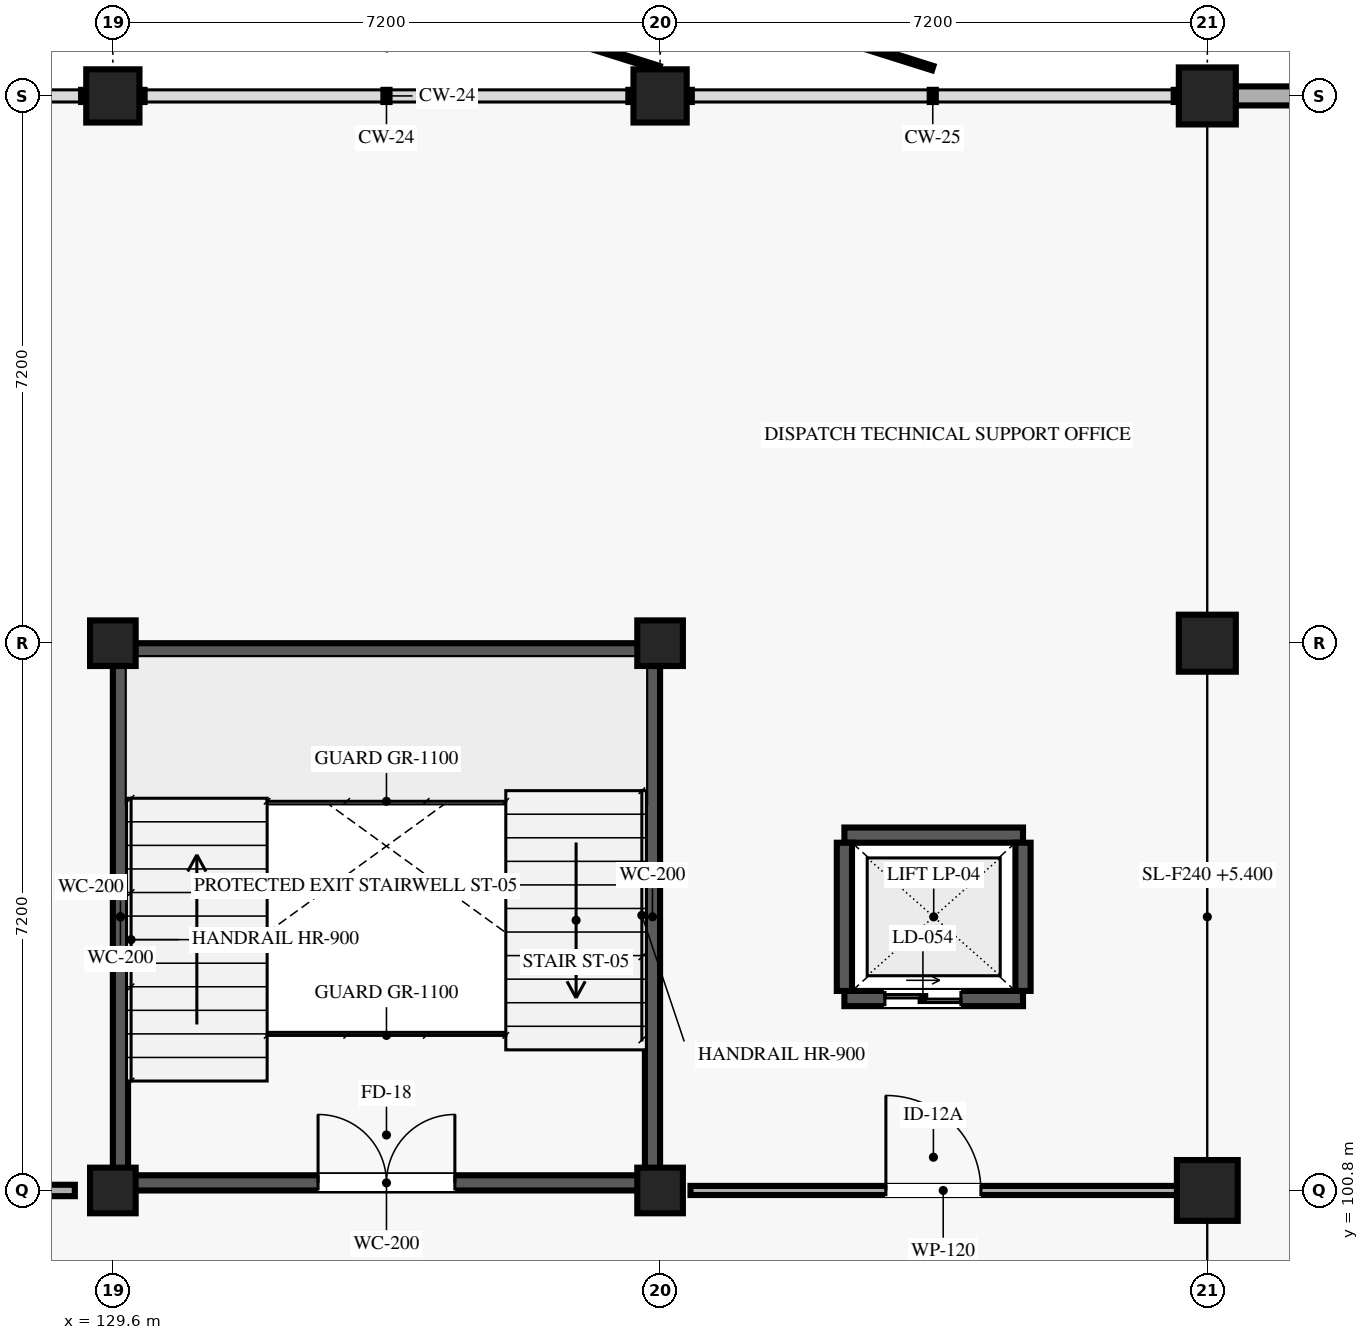
"""IFC4 building model, lengths in metres.
Left out: names, types, materials, properties, quantities, classifications, styles, units other than length and angle.
Written with IfcOpenShell. Run it as: python <this file> out.ifc"""

import sys

from ifc_helpers import new_model, si_unit, direction, frame, frame_2d, origin, origin_2d, place, context, subcontext, project, spatial, rectangle, extrude, element, fill, save


model = new_model("IFC4")
c1 = context("Model", 3, precision=1e-05, world=origin(), true_north=direction((0.0, 1.0)))
c2 = subcontext(c1, "Body", "Model", "MODEL_VIEW")
j1 = project(units=[si_unit("LENGTHUNIT", "METRE"), si_unit("PLANEANGLEUNIT", "RADIAN")], contexts=[c1])
p1 = place(None, origin())
s1 = spatial("IfcSite", under=j1, at=p1, CompositionType="ELEMENT")
p2 = place(p1, origin())
s2 = spatial("IfcBuilding", under=s1, at=p2, CompositionType="ELEMENT")
p3 = place(p2, frame((0.0, 0.0, 5.4)))
s3 = spatial("IfcBuildingStorey", under=s2, at=p3, CompositionType="ELEMENT", Elevation=5.4)
for number, where, z_axis, x_axis in (
    (1, (129.6, 100.8, 0.0), (0.0, 0.0, 1.0), (1.0, 0.0, 0.0)),
    (2, (129.6, 108.0, 0.0), (0.0, 0.0, 1.0), (1.0, 0.0, 0.0)),
):
    element("IfcColumn", number, at=place(p3, frame(where, z_axis=z_axis, x_axis=x_axis)), inside=s3, PredefinedType="COLUMN", context=c2, shape_type="SweptSolid", body=[
        extrude(rectangle(XDim=0.6, YDim=0.6, at=origin_2d()), origin(), (0.0, 0.0, 1.0), 4.05),
    ])
p4 = place(p3, frame((129.6, 115.2, 0.0), z_axis=(0.0, 0.0, 1.0), x_axis=(1.0, 0.0, 0.0)))
e3 = element("IfcColumn", 3, at=p4, inside=s3, PredefinedType="COLUMN", context=c2, shape_type="SweptSolid", body=[
    extrude(rectangle(XDim=0.7, YDim=0.7, at=origin_2d()), origin(), (0.0, 0.0, 1.0), 4.05),
])
for number, where, z_axis, x_axis in (
    (4, (136.8, 100.8, 0.0), (0.0, 0.0, 1.0), (1.0, 0.0, 0.0)),
    (5, (136.8, 108.0, 0.0), (0.0, 0.0, 1.0), (1.0, 0.0, 0.0)),
):
    element("IfcColumn", number, at=place(p3, frame(where, z_axis=z_axis, x_axis=x_axis)), inside=s3, PredefinedType="COLUMN", context=c2, shape_type="SweptSolid", body=[
        extrude(rectangle(XDim=0.6, YDim=0.6, at=origin_2d()), origin(), (0.0, 0.0, 1.0), 4.05),
    ])
p5 = place(p3, frame((136.8, 115.2, 0.0), z_axis=(0.0, 0.0, 1.0), x_axis=(1.0, 0.0, 0.0)))
e6 = element("IfcColumn", 6, at=p5, inside=s3, PredefinedType="COLUMN", context=c2, shape_type="SweptSolid", body=[
    extrude(rectangle(XDim=0.7, YDim=0.7, at=origin_2d()), origin(), (0.0, 0.0, 1.0), 4.05),
])
p6 = place(p3, frame((144.0, 100.8, 0.0), z_axis=(0.0, 0.0, 1.0), x_axis=(1.0, 0.0, 0.0)))
e7 = element("IfcColumn", 7, at=p6, inside=s3, PredefinedType="COLUMN", context=c2, shape_type="SweptSolid", body=[
    extrude(rectangle(XDim=0.8, YDim=0.8, at=origin_2d()), origin(), (0.0, 0.0, 1.0), 4.05),
])
for number, where, z_axis, x_axis in (
    (8, (144.0, 108.0, 0.0), (0.0, 0.0, 1.0), (1.0, 0.0, 0.0)),
    (9, (144.0, 115.2, 0.0), (0.0, 0.0, 1.0), (1.0, 0.0, 0.0)),
):
    element("IfcColumn", number, at=place(p3, frame(where, z_axis=z_axis, x_axis=x_axis)), inside=s3, PredefinedType="COLUMN", context=c2, shape_type="SweptSolid", body=[
        extrude(rectangle(XDim=0.75, YDim=0.75, at=origin_2d()), origin(), (0.0, 0.0, 1.0), 4.05),
    ])
p7 = place(p3, frame((144.37, 115.2, 0.0), z_axis=(0.0, 0.0, 1.0), x_axis=(1.0, 0.0, 0.0)))
e10 = element("IfcWall", 10, at=p7, inside=s3, PredefinedType="SOLIDWALL", context=c2, shape_type="SweptSolid", body=[
    extrude(rectangle(XDim=6.46, YDim=0.25, at=frame_2d((3.23, 0.0))), origin(), (0.0, 0.0, 1.0), 3.195),
])
p8 = place(p7, frame((1.63, 0.0, 0.85)))
e11 = element("IfcOpeningElement", 11, at=p8, cuts=e10, PredefinedType="OPENING", context=c2, shape_type="SweptSolid", body=[
    extrude(rectangle(XDim=3.2, YDim=1.95, at=frame_2d((1.6, 0.975))), frame((0.0, 0.135, 0.0), z_axis=(0.0, -1.0, 0.0), x_axis=(1.0, 0.0, 0.0)), (0.0, 0.0, 1.0), 0.27),
])
p9 = place(p3, frame((129.8, 100.9, 0.0), z_axis=(0.0, 0.0, 1.0), x_axis=(1.0, 0.0, 0.0)))
e12 = element("IfcWall", 12, at=p9, inside=s3, PredefinedType="SHEAR", context=c2, shape_type="SweptSolid", body=[
    extrude(rectangle(XDim=6.8, YDim=0.2, at=frame_2d((3.4, 0.0))), origin(), (0.0, 0.0, 1.0), 3.81),
])
p10 = place(p9, frame((2.5, 0.0, 0.0)))
e13 = element("IfcOpeningElement", 13, at=p10, cuts=e12, PredefinedType="OPENING", context=c2, shape_type="SweptSolid", body=[
    extrude(rectangle(XDim=1.8, YDim=2.2, at=frame_2d((0.9, 1.1))), frame((0.0, 0.11, 0.0), z_axis=(0.0, -1.0, 0.0), x_axis=(1.0, 0.0, 0.0)), (0.0, 0.0, 1.0), 0.22),
])
for number, where, z_axis, x_axis in (
    (14, (129.8, 107.9, 0.0), (0.0, 0.0, 1.0), (1.0, 0.0, 0.0)),
    (15, (129.7, 101.0, 0.0), (0.0, 0.0, 1.0), (0.0, 1.0, 0.0)),
    (16, (136.7, 101.0, 0.0), (0.0, 0.0, 1.0), (0.0, 1.0, 0.0)),
):
    element("IfcWall", number, at=place(p3, frame(where, z_axis=z_axis, x_axis=x_axis)), inside=s3, PredefinedType="SHEAR", context=c2, shape_type="SweptSolid", body=[
        extrude(rectangle(XDim=6.8, YDim=0.2, at=frame_2d((3.4, 0.0))), origin(), (0.0, 0.0, 1.0), 3.81),
    ])
p11 = place(p3, frame((139.225, 103.325, 0.0), z_axis=(0.0, 0.0, 1.0), x_axis=(1.0, 0.0, 0.0)))
e17 = element("IfcWall", 17, at=p11, inside=s3, PredefinedType="SHEAR", context=c2, shape_type="SweptSolid", body=[
    extrude(rectangle(XDim=2.35, YDim=0.2, at=frame_2d((1.175, 0.0))), origin(), (0.0, 0.0, 1.0), 3.81),
])
p12 = place(p11, frame((0.533, 0.0, 0.0)))
e18 = element("IfcOpeningElement", 18, at=p12, cuts=e17, PredefinedType="OPENING", context=c2, shape_type="SweptSolid", body=[
    extrude(rectangle(XDim=1.0, YDim=2.1, at=frame_2d((0.5, 1.05))), frame((0.0, 0.11, 0.0), z_axis=(0.0, -1.0, 0.0), x_axis=(1.0, 0.0, 0.0)), (0.0, 0.0, 1.0), 0.22),
])
p13 = place(p3, frame((139.225, 105.475, 0.0), z_axis=(0.0, 0.0, 1.0), x_axis=(1.0, 0.0, 0.0)))
e19 = element("IfcWall", 19, at=p13, inside=s3, PredefinedType="SHEAR", context=c2, shape_type="SweptSolid", body=[
    extrude(rectangle(XDim=2.35, YDim=0.2, at=frame_2d((1.175, 0.0))), origin(), (0.0, 0.0, 1.0), 3.81),
])
for number, where, z_axis, x_axis in (
    (20, (139.225, 103.425, 0.0), (0.0, 0.0, 1.0), (0.0, 1.0, 0.0)),
    (21, (141.575, 103.425, 0.0), (0.0, 0.0, 1.0), (0.0, 1.0, 0.0)),
):
    element("IfcWall", number, at=place(p3, frame(where, z_axis=z_axis, x_axis=x_axis)), inside=s3, PredefinedType="SHEAR", context=c2, shape_type="SweptSolid", body=[
        extrude(rectangle(XDim=1.95, YDim=0.2, at=frame_2d((0.975, 0.0))), origin(), (0.0, 0.0, 1.0), 3.81),
    ])
p14 = place(p3, frame((94.1, 100.8, 0.0), z_axis=(0.0, 0.0, 1.0), x_axis=(1.0, 0.0, 0.0)))
e22 = element("IfcWall", 22, at=p14, inside=s3, PredefinedType="PARTITIONING", context=c2, shape_type="SweptSolid", body=[
    extrude(rectangle(XDim=35.0, YDim=0.15, at=frame_2d((17.5, 0.0))), origin(), (0.0, 0.0, 1.0), 3.25),
])
p15 = place(p14, frame((9.292, 0.0, 0.0)))
e23 = element("IfcOpeningElement", 23, at=p15, cuts=e22, PredefinedType="OPENING", context=c2, shape_type="SweptSolid", body=[
    extrude(rectangle(XDim=2.1, YDim=2.4, at=frame_2d((1.05, 1.2))), frame((0.0, 0.085, 0.0), z_axis=(0.0, -1.0, 0.0), x_axis=(1.0, 0.0, 0.0)), (0.0, 0.0, 1.0), 0.17),
])
p16 = place(p3, frame((137.2, 100.8, 0.0), z_axis=(0.0, 0.0, 1.0), x_axis=(1.0, 0.0, 0.0)))
e24 = element("IfcWall", 24, at=p16, inside=s3, PredefinedType="PARTITIONING", context=c2, shape_type="SweptSolid", body=[
    extrude(rectangle(XDim=6.65, YDim=0.12, at=frame_2d((3.325, 0.0))), origin(), (0.0, 0.0, 1.0), 3.25),
])
p17 = place(p16, frame((2.571, 0.0, 0.0)))
e25 = element("IfcOpeningElement", 25, at=p17, cuts=e24, PredefinedType="OPENING", context=c2, shape_type="SweptSolid", body=[
    extrude(rectangle(XDim=1.25, YDim=2.2, at=frame_2d((0.625, 1.1))), frame((0.0, 0.07, 0.0), z_axis=(0.0, -1.0, 0.0), x_axis=(1.0, 0.0, 0.0)), (0.0, 0.0, 1.0), 0.14),
])
p18 = place(p10, origin())
e26 = element("IfcDoor", 26, at=p18, inside=s3, OperationType="DOUBLE_DOOR_SINGLE_SWING", PredefinedType="DOOR", context=c2, shape_type="SweptSolid", body=[
    extrude(rectangle(XDim=1.8, YDim=2.2, at=frame_2d((0.9, 1.1))), frame((0.0, 0.025, 0.0), z_axis=(0.0, -1.0, 0.0), x_axis=(1.0, 0.0, 0.0)), (0.0, 0.0, 1.0), 0.05),
])
fill(e13, e26)
p19 = place(p12, origin())
e27 = element("IfcDoor", 27, at=p19, inside=s3, OperationType="DOUBLE_DOOR_SLIDING", PredefinedType="DOOR", context=c2, shape_type="SweptSolid", body=[
    extrude(rectangle(XDim=1.0, YDim=2.1, at=frame_2d((0.5, 1.05))), frame((0.0, 0.025, 0.0), z_axis=(0.0, -1.0, 0.0), x_axis=(1.0, 0.0, 0.0)), (0.0, 0.0, 1.0), 0.05),
])
fill(e18, e27)
p20 = place(p17, origin())
e28 = element("IfcDoor", 28, at=p20, inside=s3, OperationType="SINGLE_SWING_LEFT", PredefinedType="DOOR", context=c2, shape_type="SweptSolid", body=[
    extrude(rectangle(XDim=1.25, YDim=2.2, at=frame_2d((0.625, 1.1))), frame((0.0, 0.025, 0.0), z_axis=(0.0, -1.0, 0.0), x_axis=(1.0, 0.0, 0.0)), (0.0, 0.0, 1.0), 0.05),
])
fill(e25, e28)
save(model, sys.argv[1])
